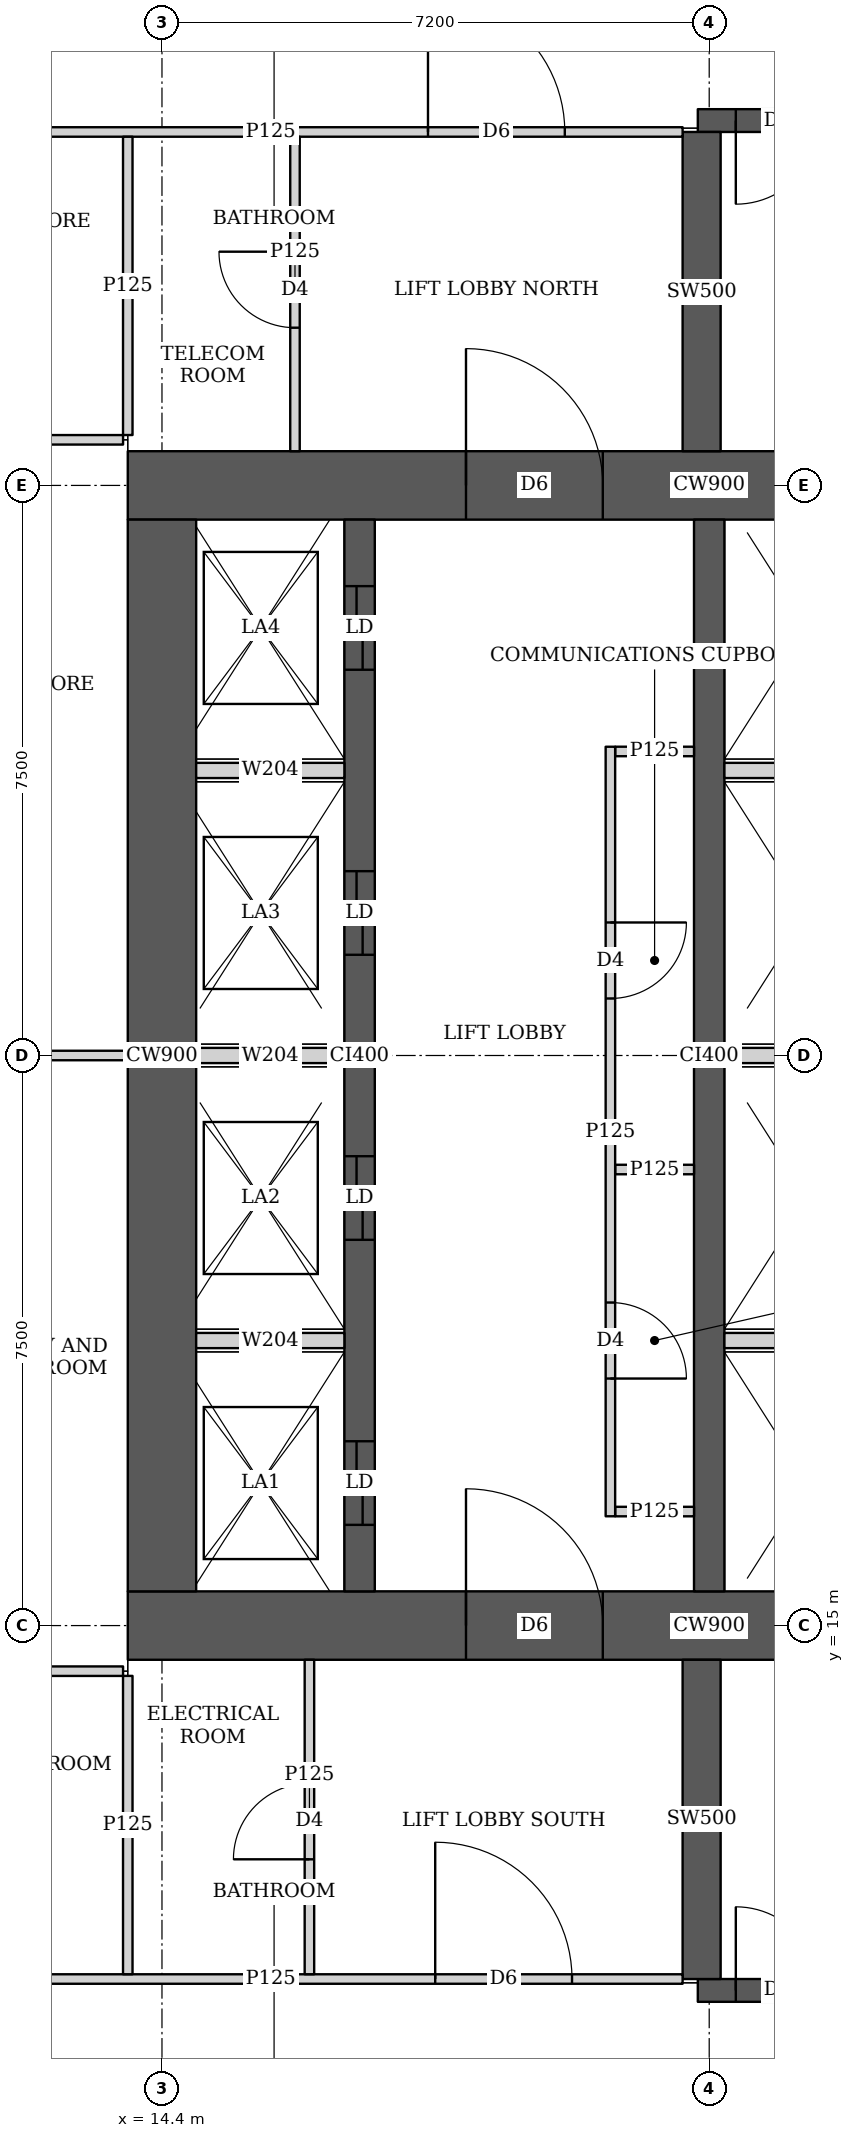
"""IFC4 building model, lengths in metres.
Left out: names, types, materials, properties, quantities, classifications, styles, units other than length and angle.
Written with IfcOpenShell. Run it as: python <this file> out.ifc"""

import sys

from ifc_helpers import new_model, si_unit, direction, frame, frame_2d, origin, place, context, subcontext, project, spatial, rectangle, extrude, element, fill, save


model = new_model("IFC4")
c1 = context("Model", 3, precision=1e-05, world=origin(), true_north=direction((0.0, 1.0)))
c2 = subcontext(c1, "Body", "Model", "MODEL_VIEW")
j1 = project(units=[si_unit("LENGTHUNIT", "METRE"), si_unit("PLANEANGLEUNIT", "RADIAN")], contexts=[c1])
p1 = place(None, origin())
s1 = spatial("IfcSite", under=j1, at=p1, CompositionType="ELEMENT")
p2 = place(p1, origin())
s2 = spatial("IfcBuilding", under=s1, at=p2, CompositionType="ELEMENT")
p3 = place(p2, frame((0.0, 0.0, 68.75)))
s3 = spatial("IfcBuildingStorey", under=s2, at=p3, CompositionType="ELEMENT", Elevation=68.75)
p4 = place(p3, frame((13.95, 15.0, 0.0), z_axis=(0.0, 0.0, 1.0), x_axis=(1.0, 0.0, 0.0)))
e1 = element("IfcWall", 1, at=p4, inside=s3, PredefinedType="SHEAR", context=c2, shape_type="SweptSolid", body=[
    extrude(rectangle(XDim=15.3, YDim=0.9, at=frame_2d((7.65, 0.0))), origin(), (0.0, 0.0, 1.0), 3.75),
])
p5 = place(p4, frame((4.45, 0.0, 0.0)))
e2 = element("IfcOpeningElement", 2, at=p5, cuts=e1, PredefinedType="OPENING", context=c2, shape_type="SweptSolid", body=[
    extrude(rectangle(XDim=1.8, YDim=2.1, at=frame_2d((0.9, 1.05))), frame((0.0, 0.46, 0.0), z_axis=(0.0, -1.0, 0.0), x_axis=(1.0, 0.0, 0.0)), (0.0, 0.0, 1.0), 0.92),
])
p6 = place(p4, frame((10.7, 0.0, 0.0)))
e3 = element("IfcOpeningElement", 3, at=p6, cuts=e1, PredefinedType="OPENING", context=c2, shape_type="SweptSolid", body=[
    extrude(rectangle(XDim=1.1, YDim=2.1, at=frame_2d((0.55, 1.05))), frame((0.0, 0.46, 0.0), z_axis=(0.0, -1.0, 0.0), x_axis=(1.0, 0.0, 0.0)), (0.0, 0.0, 1.0), 0.92),
])
p7 = place(p3, frame((13.95, 30.0, 0.0), z_axis=(0.0, 0.0, 1.0), x_axis=(1.0, 0.0, 0.0)))
e4 = element("IfcWall", 4, at=p7, inside=s3, PredefinedType="SHEAR", context=c2, shape_type="SweptSolid", body=[
    extrude(rectangle(XDim=15.3, YDim=0.9, at=frame_2d((7.65, 0.0))), origin(), (0.0, 0.0, 1.0), 3.75),
])
p8 = place(p7, frame((4.45, 0.0, 0.0)))
e5 = element("IfcOpeningElement", 5, at=p8, cuts=e4, PredefinedType="OPENING", context=c2, shape_type="SweptSolid", body=[
    extrude(rectangle(XDim=1.8, YDim=2.1, at=frame_2d((0.9, 1.05))), frame((0.0, 0.46, 0.0), z_axis=(0.0, -1.0, 0.0), x_axis=(1.0, 0.0, 0.0)), (0.0, 0.0, 1.0), 0.92),
])
p9 = place(p7, frame((10.7, 0.0, 0.0)))
e6 = element("IfcOpeningElement", 6, at=p9, cuts=e4, PredefinedType="OPENING", context=c2, shape_type="SweptSolid", body=[
    extrude(rectangle(XDim=1.1, YDim=2.1, at=frame_2d((0.55, 1.05))), frame((0.0, 0.46, 0.0), z_axis=(0.0, -1.0, 0.0), x_axis=(1.0, 0.0, 0.0)), (0.0, 0.0, 1.0), 0.92),
])
p10 = place(p3, frame((14.4, 15.45, 0.0), z_axis=(0.0, 0.0, 1.0), x_axis=(0.0, 1.0, 0.0)))
e7 = element("IfcWall", 7, at=p10, inside=s3, PredefinedType="SHEAR", context=c2, shape_type="SweptSolid", body=[
    extrude(rectangle(XDim=14.1, YDim=0.9, at=frame_2d((7.05, 0.0))), origin(), (0.0, 0.0, 1.0), 3.75),
])
p11 = place(p3, frame((17.0, 15.45, 0.0), z_axis=(0.0, 0.0, 1.0), x_axis=(0.0, 1.0, 0.0)))
e8 = element("IfcWall", 8, at=p11, inside=s3, PredefinedType="SHEAR", context=c2, shape_type="SweptSolid", body=[
    extrude(rectangle(XDim=14.1, YDim=0.4, at=frame_2d((7.05, 0.0))), origin(), (0.0, 0.0, 1.0), 3.75),
])
p12 = place(p11, frame((0.875, 0.0, 0.0)))
e9 = element("IfcOpeningElement", 9, at=p12, cuts=e8, PredefinedType="OPENING", context=c2, shape_type="SweptSolid", body=[
    extrude(rectangle(XDim=1.1, YDim=2.1, at=frame_2d((0.55, 1.05))), frame((0.0, 0.21, 0.0), z_axis=(0.0, -1.0, 0.0), x_axis=(1.0, 0.0, 0.0)), (0.0, 0.0, 1.0), 0.42),
])
p13 = place(p11, frame((4.625, 0.0, 0.0)))
e10 = element("IfcOpeningElement", 10, at=p13, cuts=e8, PredefinedType="OPENING", context=c2, shape_type="SweptSolid", body=[
    extrude(rectangle(XDim=1.1, YDim=2.1, at=frame_2d((0.55, 1.05))), frame((0.0, 0.21, 0.0), z_axis=(0.0, -1.0, 0.0), x_axis=(1.0, 0.0, 0.0)), (0.0, 0.0, 1.0), 0.42),
])
p14 = place(p11, frame((8.375, 0.0, 0.0)))
e11 = element("IfcOpeningElement", 11, at=p14, cuts=e8, PredefinedType="OPENING", context=c2, shape_type="SweptSolid", body=[
    extrude(rectangle(XDim=1.1, YDim=2.1, at=frame_2d((0.55, 1.05))), frame((0.0, 0.21, 0.0), z_axis=(0.0, -1.0, 0.0), x_axis=(1.0, 0.0, 0.0)), (0.0, 0.0, 1.0), 0.42),
])
p15 = place(p11, frame((12.125, 0.0, 0.0)))
e12 = element("IfcOpeningElement", 12, at=p15, cuts=e8, PredefinedType="OPENING", context=c2, shape_type="SweptSolid", body=[
    extrude(rectangle(XDim=1.1, YDim=2.1, at=frame_2d((0.55, 1.05))), frame((0.0, 0.21, 0.0), z_axis=(0.0, -1.0, 0.0), x_axis=(1.0, 0.0, 0.0)), (0.0, 0.0, 1.0), 0.42),
])
p16 = place(p3, frame((21.6, 15.45, 0.0), z_axis=(0.0, 0.0, 1.0), x_axis=(0.0, 1.0, 0.0)))
e13 = element("IfcWall", 13, at=p16, inside=s3, PredefinedType="SHEAR", context=c2, shape_type="SweptSolid", body=[
    extrude(rectangle(XDim=14.1, YDim=0.4, at=frame_2d((7.05, 0.0))), origin(), (0.0, 0.0, 1.0), 3.75),
])
p17 = place(p3, frame((21.45, 10.2, 0.0), z_axis=(0.0, 0.0, 1.0), x_axis=(1.0, 0.0, 0.0)))
e14 = element("IfcWall", 14, at=p17, inside=s3, PredefinedType="SHEAR", context=c2, shape_type="SweptSolid", body=[
    extrude(rectangle(XDim=7.5, YDim=0.3, at=frame_2d((3.75, 0.0))), origin(), (0.0, 0.0, 1.0), 3.75),
])
p18 = place(p17, frame((0.5, 0.0, 0.0)))
e15 = element("IfcOpeningElement", 15, at=p18, cuts=e14, PredefinedType="OPENING", context=c2, shape_type="SweptSolid", body=[
    extrude(rectangle(XDim=1.1, YDim=2.1, at=frame_2d((0.55, 1.05))), frame((0.0, 0.16, 0.0), z_axis=(0.0, -1.0, 0.0), x_axis=(1.0, 0.0, 0.0)), (0.0, 0.0, 1.0), 0.32),
])
p19 = place(p3, frame((21.5, 10.35, 0.0), z_axis=(0.0, 0.0, 1.0), x_axis=(0.0, 1.0, 0.0)))
e16 = element("IfcWall", 16, at=p19, inside=s3, PredefinedType="SHEAR", context=c2, shape_type="SweptSolid", body=[
    extrude(rectangle(XDim=4.2, YDim=0.5, at=frame_2d((2.1, 0.0))), origin(), (0.0, 0.0, 1.0), 3.75),
])
p20 = place(p3, frame((21.45, 34.8, 0.0), z_axis=(0.0, 0.0, 1.0), x_axis=(1.0, 0.0, 0.0)))
e17 = element("IfcWall", 17, at=p20, inside=s3, PredefinedType="SHEAR", context=c2, shape_type="SweptSolid", body=[
    extrude(rectangle(XDim=7.5, YDim=0.3, at=frame_2d((3.75, 0.0))), origin(), (0.0, 0.0, 1.0), 3.75),
])
p21 = place(p20, frame((0.5, 0.0, 0.0)))
e18 = element("IfcOpeningElement", 18, at=p21, cuts=e17, PredefinedType="OPENING", context=c2, shape_type="SweptSolid", body=[
    extrude(rectangle(XDim=1.1, YDim=2.1, at=frame_2d((0.55, 1.05))), frame((0.0, 0.16, 0.0), z_axis=(0.0, -1.0, 0.0), x_axis=(1.0, 0.0, 0.0)), (0.0, 0.0, 1.0), 0.32),
])
p22 = place(p3, frame((21.5, 30.45, 0.0), z_axis=(0.0, 0.0, 1.0), x_axis=(0.0, 1.0, 0.0)))
e19 = element("IfcWall", 19, at=p22, inside=s3, PredefinedType="SHEAR", context=c2, shape_type="SweptSolid", body=[
    extrude(rectangle(XDim=4.2, YDim=0.5, at=frame_2d((2.1, 0.0))), origin(), (0.0, 0.0, 1.0), 3.75),
])
p23 = place(p3, frame((10.413, 14.4, 0.0), z_axis=(0.0, 0.0, 1.0), x_axis=(1.0, 0.0, 0.0)))
e20 = element("IfcWall", 20, at=p23, inside=s3, PredefinedType="PARTITIONING", context=c2, shape_type="SweptSolid", body=[
    extrude(rectangle(XDim=3.475, YDim=0.125, at=frame_2d((1.737, 0.0))), origin(), (0.0, 0.0, 1.0), 3.45),
])
p24 = place(p3, frame((10.413, 22.5, 0.0), z_axis=(0.0, 0.0, 1.0), x_axis=(1.0, 0.0, 0.0)))
e21 = element("IfcWall", 21, at=p24, inside=s3, PredefinedType="PARTITIONING", context=c2, shape_type="SweptSolid", body=[
    extrude(rectangle(XDim=3.537, YDim=0.125, at=frame_2d((1.769, 0.0))), origin(), (0.0, 0.0, 1.0), 3.45),
])
p25 = place(p3, frame((10.413, 30.6, 0.0), z_axis=(0.0, 0.0, 1.0), x_axis=(1.0, 0.0, 0.0)))
e22 = element("IfcWall", 22, at=p25, inside=s3, PredefinedType="PARTITIONING", context=c2, shape_type="SweptSolid", body=[
    extrude(rectangle(XDim=3.475, YDim=0.125, at=frame_2d((1.737, 0.0))), origin(), (0.0, 0.0, 1.0), 3.45),
])
p26 = place(p3, frame((13.95, 10.413, 0.0), z_axis=(0.0, 0.0, 1.0), x_axis=(0.0, 1.0, 0.0)))
e23 = element("IfcWall", 23, at=p26, inside=s3, PredefinedType="PARTITIONING", context=c2, shape_type="SweptSolid", body=[
    extrude(rectangle(XDim=3.925, YDim=0.125, at=frame_2d((1.962, 0.0))), origin(), (0.0, 0.0, 1.0), 3.45),
])
p27 = place(p3, frame((13.95, 30.663, 0.0), z_axis=(0.0, 0.0, 1.0), x_axis=(0.0, 1.0, 0.0)))
e24 = element("IfcWall", 24, at=p27, inside=s3, PredefinedType="PARTITIONING", context=c2, shape_type="SweptSolid", body=[
    extrude(rectangle(XDim=3.924, YDim=0.125, at=frame_2d((1.962, 0.0))), origin(), (0.0, 0.0, 1.0), 3.45),
])
p28 = place(p3, frame((10.413, 10.35, 0.0), z_axis=(0.0, 0.0, 1.0), x_axis=(1.0, 0.0, 0.0)))
e25 = element("IfcWall", 25, at=p28, inside=s3, PredefinedType="PARTITIONING", context=c2, shape_type="SweptSolid", body=[
    extrude(rectangle(XDim=10.837, YDim=0.125, at=frame_2d((5.418, 0.0))), origin(), (0.0, 0.0, 1.0), 3.45),
])
p29 = place(p28, frame((7.582, 0.0, 0.0)))
e26 = element("IfcOpeningElement", 26, at=p29, cuts=e25, PredefinedType="OPENING", context=c2, shape_type="SweptSolid", body=[
    extrude(rectangle(XDim=1.8, YDim=2.1, at=frame_2d((0.9, 1.05))), frame((0.0, 0.073, 0.0), z_axis=(0.0, -1.0, 0.0), x_axis=(1.0, 0.0, 0.0)), (0.0, 0.0, 1.0), 0.145),
])
p30 = place(p3, frame((10.413, 34.65, 0.0), z_axis=(0.0, 0.0, 1.0), x_axis=(1.0, 0.0, 0.0)))
e27 = element("IfcWall", 27, at=p30, inside=s3, PredefinedType="PARTITIONING", context=c2, shape_type="SweptSolid", body=[
    extrude(rectangle(XDim=10.837, YDim=0.125, at=frame_2d((5.418, 0.0))), origin(), (0.0, 0.0, 1.0), 3.45),
])
p31 = place(p30, frame((7.487, 0.0, 0.0)))
e28 = element("IfcOpeningElement", 28, at=p31, cuts=e27, PredefinedType="OPENING", context=c2, shape_type="SweptSolid", body=[
    extrude(rectangle(XDim=1.8, YDim=2.1, at=frame_2d((0.9, 1.05))), frame((0.0, 0.073, 0.0), z_axis=(0.0, -1.0, 0.0), x_axis=(1.0, 0.0, 0.0)), (0.0, 0.0, 1.0), 0.145),
])
p32 = place(p3, frame((16.34, 10.413, 0.0), z_axis=(0.0, 0.0, 1.0), x_axis=(0.0, 1.0, 0.0)))
e29 = element("IfcWall", 29, at=p32, inside=s3, PredefinedType="PARTITIONING", context=c2, shape_type="SweptSolid", body=[
    extrude(rectangle(XDim=4.137, YDim=0.125, at=frame_2d((2.068, 0.0))), origin(), (0.0, 0.0, 1.0), 3.45),
])
p33 = place(p32, frame((1.512, 0.0, 0.0)))
e30 = element("IfcOpeningElement", 30, at=p33, cuts=e29, PredefinedType="OPENING", context=c2, shape_type="SweptSolid", body=[
    extrude(rectangle(XDim=1.0, YDim=2.1, at=frame_2d((0.5, 1.05))), frame((0.0, 0.073, 0.0), z_axis=(0.0, -1.0, 0.0), x_axis=(1.0, 0.0, 0.0)), (0.0, 0.0, 1.0), 0.145),
])
p34 = place(p3, frame((16.15, 30.45, 0.0), z_axis=(0.0, 0.0, 1.0), x_axis=(0.0, 1.0, 0.0)))
e31 = element("IfcWall", 31, at=p34, inside=s3, PredefinedType="PARTITIONING", context=c2, shape_type="SweptSolid", body=[
    extrude(rectangle(XDim=4.137, YDim=0.125, at=frame_2d((2.068, 0.0))), origin(), (0.0, 0.0, 1.0), 3.45),
])
p35 = place(p34, frame((1.625, 0.0, 0.0)))
e32 = element("IfcOpeningElement", 32, at=p35, cuts=e31, PredefinedType="OPENING", context=c2, shape_type="SweptSolid", body=[
    extrude(rectangle(XDim=1.0, YDim=2.1, at=frame_2d((0.5, 1.05))), frame((0.0, 0.073, 0.0), z_axis=(0.0, -1.0, 0.0), x_axis=(1.0, 0.0, 0.0)), (0.0, 0.0, 1.0), 0.145),
])
p36 = place(p3, frame((20.3, 16.438, 0.0), z_axis=(0.0, 0.0, 1.0), x_axis=(0.0, 1.0, 0.0)))
e33 = element("IfcWall", 33, at=p36, inside=s3, PredefinedType="PARTITIONING", context=c2, shape_type="SweptSolid", body=[
    extrude(rectangle(XDim=10.124, YDim=0.125, at=frame_2d((5.062, 0.0))), origin(), (0.0, 0.0, 1.0), 3.45),
])
p37 = place(p36, frame((1.812, 0.0, 0.0)))
e34 = element("IfcOpeningElement", 34, at=p37, cuts=e33, PredefinedType="OPENING", context=c2, shape_type="SweptSolid", body=[
    extrude(rectangle(XDim=1.0, YDim=2.1, at=frame_2d((0.5, 1.05))), frame((0.0, 0.073, 0.0), z_axis=(0.0, -1.0, 0.0), x_axis=(1.0, 0.0, 0.0)), (0.0, 0.0, 1.0), 0.145),
])
p38 = place(p36, frame((6.812, 0.0, 0.0)))
e35 = element("IfcOpeningElement", 35, at=p38, cuts=e33, PredefinedType="OPENING", context=c2, shape_type="SweptSolid", body=[
    extrude(rectangle(XDim=1.0, YDim=2.1, at=frame_2d((0.5, 1.05))), frame((0.0, 0.073, 0.0), z_axis=(0.0, -1.0, 0.0), x_axis=(1.0, 0.0, 0.0)), (0.0, 0.0, 1.0), 0.145),
])
for number, where, z_axis, x_axis in (
    (36, (20.363, 16.5, 0.0), (0.0, 0.0, 1.0), (1.0, 0.0, 0.0)),
    (37, (20.363, 26.5, 0.0), (0.0, 0.0, 1.0), (1.0, 0.0, 0.0)),
    (38, (20.363, 21.0, 0.0), (0.0, 0.0, 1.0), (1.0, 0.0, 0.0)),
):
    element("IfcWall", number, at=place(p3, frame(where, z_axis=z_axis, x_axis=x_axis)), inside=s3, PredefinedType="PARTITIONING", context=c2, shape_type="SweptSolid", body=[
        extrude(rectangle(XDim=1.037, YDim=0.125, at=frame_2d((0.519, 0.0))), origin(), (0.0, 0.0, 1.0), 3.45),
    ])
p39 = place(p3, frame((14.85, 18.75, 0.0), z_axis=(0.0, 0.0, 1.0), x_axis=(1.0, 0.0, 0.0)))
e39 = element("IfcWall", 39, at=p39, inside=s3, PredefinedType="SOLIDWALL", context=c2, shape_type="SweptSolid", body=[
    extrude(rectangle(XDim=1.95, YDim=0.2, at=frame_2d((0.975, 0.0))), origin(), (0.0, 0.0, 1.0), 3.45),
])
p40 = place(p3, frame((21.8, 18.75, 0.0), z_axis=(0.0, 0.0, 1.0), x_axis=(1.0, 0.0, 0.0)))
e40 = element("IfcWall", 40, at=p40, inside=s3, PredefinedType="SOLIDWALL", context=c2, shape_type="SweptSolid", body=[
    extrude(rectangle(XDim=2.2, YDim=0.2, at=frame_2d((1.1, 0.0))), origin(), (0.0, 0.0, 1.0), 3.45),
])
p41 = place(p3, frame((14.85, 22.5, 0.0), z_axis=(0.0, 0.0, 1.0), x_axis=(1.0, 0.0, 0.0)))
e41 = element("IfcWall", 41, at=p41, inside=s3, PredefinedType="SOLIDWALL", context=c2, shape_type="SweptSolid", body=[
    extrude(rectangle(XDim=1.95, YDim=0.2, at=frame_2d((0.975, 0.0))), origin(), (0.0, 0.0, 1.0), 3.45),
])
p42 = place(p3, frame((21.8, 22.5, 0.0), z_axis=(0.0, 0.0, 1.0), x_axis=(1.0, 0.0, 0.0)))
e42 = element("IfcWall", 42, at=p42, inside=s3, PredefinedType="SOLIDWALL", context=c2, shape_type="SweptSolid", body=[
    extrude(rectangle(XDim=2.2, YDim=0.2, at=frame_2d((1.1, 0.0))), origin(), (0.0, 0.0, 1.0), 3.45),
])
p43 = place(p3, frame((14.85, 26.25, 0.0), z_axis=(0.0, 0.0, 1.0), x_axis=(1.0, 0.0, 0.0)))
e43 = element("IfcWall", 43, at=p43, inside=s3, PredefinedType="SOLIDWALL", context=c2, shape_type="SweptSolid", body=[
    extrude(rectangle(XDim=1.95, YDim=0.2, at=frame_2d((0.975, 0.0))), origin(), (0.0, 0.0, 1.0), 3.45),
])
p44 = place(p3, frame((21.8, 26.25, 0.0), z_axis=(0.0, 0.0, 1.0), x_axis=(1.0, 0.0, 0.0)))
e44 = element("IfcWall", 44, at=p44, inside=s3, PredefinedType="SOLIDWALL", context=c2, shape_type="SweptSolid", body=[
    extrude(rectangle(XDim=2.2, YDim=0.2, at=frame_2d((1.1, 0.0))), origin(), (0.0, 0.0, 1.0), 3.45),
])
p45 = place(p33, origin())
e45 = element("IfcDoor", 45, at=p45, inside=s3, OperationType="SINGLE_SWING_LEFT", PredefinedType="DOOR", context=c2, shape_type="SweptSolid", body=[
    extrude(rectangle(XDim=1.0, YDim=2.1, at=frame_2d((0.5, 1.05))), frame((0.0, 0.025, 0.0), z_axis=(0.0, -1.0, 0.0), x_axis=(1.0, 0.0, 0.0)), (0.0, 0.0, 1.0), 0.05),
])
fill(e30, e45)
p46 = place(p29, origin())
e46 = element("IfcDoor", 46, at=p46, inside=s3, OperationType="DOUBLE_DOOR_SINGLE_SWING", PredefinedType="DOOR", context=c2, shape_type="SweptSolid", body=[
    extrude(rectangle(XDim=1.8, YDim=2.1, at=frame_2d((0.9, 1.05))), frame((0.0, 0.025, 0.0), z_axis=(0.0, -1.0, 0.0), x_axis=(1.0, 0.0, 0.0)), (0.0, 0.0, 1.0), 0.05),
])
fill(e26, e46)
p47 = place(p35, origin())
e47 = element("IfcDoor", 47, at=p47, inside=s3, OperationType="SINGLE_SWING_RIGHT", PredefinedType="DOOR", context=c2, shape_type="SweptSolid", body=[
    extrude(rectangle(XDim=1.0, YDim=2.1, at=frame_2d((0.5, 1.05))), frame((0.0, 0.025, 0.0), z_axis=(0.0, -1.0, 0.0), x_axis=(1.0, 0.0, 0.0)), (0.0, 0.0, 1.0), 0.05),
])
fill(e32, e47)
p48 = place(p31, origin())
e48 = element("IfcDoor", 48, at=p48, inside=s3, OperationType="DOUBLE_DOOR_SINGLE_SWING", PredefinedType="DOOR", context=c2, shape_type="SweptSolid", body=[
    extrude(rectangle(XDim=1.8, YDim=2.1, at=frame_2d((0.9, 1.05))), frame((0.0, 0.025, 0.0), z_axis=(0.0, -1.0, 0.0), x_axis=(1.0, 0.0, 0.0)), (0.0, 0.0, 1.0), 0.05),
])
fill(e28, e48)
p49 = place(p37, origin())
e49 = element("IfcDoor", 49, at=p49, inside=s3, OperationType="SINGLE_SWING_RIGHT", PredefinedType="DOOR", context=c2, shape_type="SweptSolid", body=[
    extrude(rectangle(XDim=1.0, YDim=2.1, at=frame_2d((0.5, 1.05))), frame((0.0, 0.025, 0.0), z_axis=(0.0, -1.0, 0.0), x_axis=(1.0, 0.0, 0.0)), (0.0, 0.0, 1.0), 0.05),
])
fill(e34, e49)
p50 = place(p38, origin())
e50 = element("IfcDoor", 50, at=p50, inside=s3, OperationType="SINGLE_SWING_LEFT", PredefinedType="DOOR", context=c2, shape_type="SweptSolid", body=[
    extrude(rectangle(XDim=1.0, YDim=2.1, at=frame_2d((0.5, 1.05))), frame((0.0, 0.025, 0.0), z_axis=(0.0, -1.0, 0.0), x_axis=(1.0, 0.0, 0.0)), (0.0, 0.0, 1.0), 0.05),
])
fill(e35, e50)
p51 = place(p5, origin())
e51 = element("IfcDoor", 51, at=p51, inside=s3, OperationType="DOUBLE_DOOR_SINGLE_SWING", PredefinedType="DOOR", context=c2, shape_type="SweptSolid", body=[
    extrude(rectangle(XDim=1.8, YDim=2.1, at=frame_2d((0.9, 1.05))), frame((0.0, 0.025, 0.0), z_axis=(0.0, -1.0, 0.0), x_axis=(1.0, 0.0, 0.0)), (0.0, 0.0, 1.0), 0.05),
])
fill(e2, e51)
p52 = place(p8, origin())
e52 = element("IfcDoor", 52, at=p52, inside=s3, OperationType="DOUBLE_DOOR_SINGLE_SWING", PredefinedType="DOOR", context=c2, shape_type="SweptSolid", body=[
    extrude(rectangle(XDim=1.8, YDim=2.1, at=frame_2d((0.9, 1.05))), frame((0.0, 0.025, 0.0), z_axis=(0.0, -1.0, 0.0), x_axis=(1.0, 0.0, 0.0)), (0.0, 0.0, 1.0), 0.05),
])
fill(e5, e52)
p53 = place(p12, origin())
e53 = element("IfcDoor", 53, at=p53, inside=s3, OperationType="DOUBLE_DOOR_SLIDING", PredefinedType="DOOR", context=c2, shape_type="SweptSolid", body=[
    extrude(rectangle(XDim=1.1, YDim=2.1, at=frame_2d((0.55, 1.05))), frame((0.0, 0.025, 0.0), z_axis=(0.0, -1.0, 0.0), x_axis=(1.0, 0.0, 0.0)), (0.0, 0.0, 1.0), 0.05),
])
fill(e9, e53)
p54 = place(p13, origin())
e54 = element("IfcDoor", 54, at=p54, inside=s3, OperationType="DOUBLE_DOOR_SLIDING", PredefinedType="DOOR", context=c2, shape_type="SweptSolid", body=[
    extrude(rectangle(XDim=1.1, YDim=2.1, at=frame_2d((0.55, 1.05))), frame((0.0, 0.025, 0.0), z_axis=(0.0, -1.0, 0.0), x_axis=(1.0, 0.0, 0.0)), (0.0, 0.0, 1.0), 0.05),
])
fill(e10, e54)
p55 = place(p14, origin())
e55 = element("IfcDoor", 55, at=p55, inside=s3, OperationType="DOUBLE_DOOR_SLIDING", PredefinedType="DOOR", context=c2, shape_type="SweptSolid", body=[
    extrude(rectangle(XDim=1.1, YDim=2.1, at=frame_2d((0.55, 1.05))), frame((0.0, 0.025, 0.0), z_axis=(0.0, -1.0, 0.0), x_axis=(1.0, 0.0, 0.0)), (0.0, 0.0, 1.0), 0.05),
])
fill(e11, e55)
p56 = place(p15, origin())
e56 = element("IfcDoor", 56, at=p56, inside=s3, OperationType="DOUBLE_DOOR_SLIDING", PredefinedType="DOOR", context=c2, shape_type="SweptSolid", body=[
    extrude(rectangle(XDim=1.1, YDim=2.1, at=frame_2d((0.55, 1.05))), frame((0.0, 0.025, 0.0), z_axis=(0.0, -1.0, 0.0), x_axis=(1.0, 0.0, 0.0)), (0.0, 0.0, 1.0), 0.05),
])
fill(e12, e56)
p57 = place(p18, origin())
e57 = element("IfcDoor", 57, at=p57, inside=s3, OperationType="SINGLE_SWING_LEFT", PredefinedType="DOOR", context=c2, shape_type="SweptSolid", body=[
    extrude(rectangle(XDim=1.1, YDim=2.1, at=frame_2d((0.55, 1.05))), frame((0.0, 0.025, 0.0), z_axis=(0.0, -1.0, 0.0), x_axis=(1.0, 0.0, 0.0)), (0.0, 0.0, 1.0), 0.05),
])
fill(e15, e57)
p58 = place(p21, origin())
e58 = element("IfcDoor", 58, at=p58, inside=s3, OperationType="SINGLE_SWING_RIGHT", PredefinedType="DOOR", context=c2, shape_type="SweptSolid", body=[
    extrude(rectangle(XDim=1.1, YDim=2.1, at=frame_2d((0.55, 1.05))), frame((0.0, 0.025, 0.0), z_axis=(0.0, -1.0, 0.0), x_axis=(1.0, 0.0, 0.0)), (0.0, 0.0, 1.0), 0.05),
])
fill(e18, e58)
save(model, sys.argv[1])
